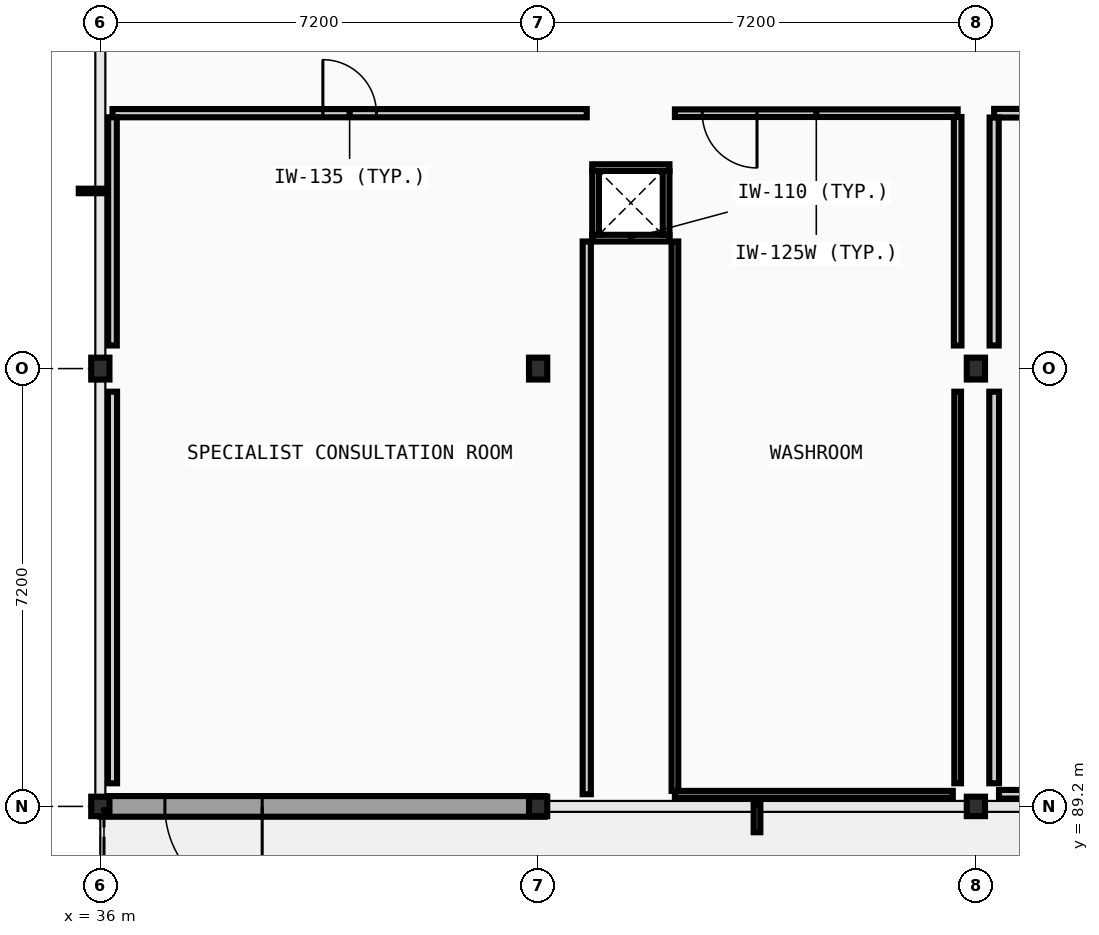
"""IFC4 building model, lengths in metres.
Left out: names, types, materials, properties, quantities, classifications, styles, units other than length and angle.
Written with IfcOpenShell. Run it as: python <this file> out.ifc"""

import sys

from ifc_helpers import new_model, si_unit, direction, frame, frame_2d, origin, origin_2d, place, context, subcontext, project, spatial, rectangle, i_section, extrude, element, fill, save


model = new_model("IFC4")
c1 = context("Model", 3, precision=1e-05, world=origin(), true_north=direction((0.0, 1.0)))
c2 = subcontext(c1, "Body", "Model", "MODEL_VIEW")
j1 = project(units=[si_unit("LENGTHUNIT", "METRE"), si_unit("PLANEANGLEUNIT", "RADIAN")], contexts=[c1])
p1 = place(None, origin())
s1 = spatial("IfcSite", under=j1, at=p1, CompositionType="ELEMENT")
p2 = place(p1, origin())
s2 = spatial("IfcBuilding", under=s1, at=p2, CompositionType="ELEMENT")
p3 = place(p2, frame((0.0, 0.0, 14.0)))
s3 = spatial("IfcBuildingStorey", under=s2, at=p3, CompositionType="ELEMENT", Elevation=14.0)
p4 = place(p3, frame((36.0, 89.2, 0.0), z_axis=(0.0, 0.0, 1.0), x_axis=(1.0, 0.0, 0.0)))
e1 = element("IfcColumn", 1, at=p4, inside=s3, PredefinedType="COLUMN", context=c2, shape_type="SweptSolid", body=[
    extrude(i_section(OverallWidth=0.3, OverallDepth=0.32, WebThickness=0.011, FlangeThickness=0.021, FilletRadius=0.027, at=origin_2d()), origin(), (0.0, 0.0, 1.0), 4.4),
])
p5 = place(p3, frame((36.0, 96.4, 0.0), z_axis=(0.0, 0.0, 1.0), x_axis=(1.0, 0.0, 0.0)))
e2 = element("IfcColumn", 2, at=p5, inside=s3, PredefinedType="COLUMN", context=c2, shape_type="SweptSolid", body=[
    extrude(i_section(OverallWidth=0.3, OverallDepth=0.36, WebThickness=0.012, FlangeThickness=0.022, FilletRadius=0.027, at=origin_2d()), origin(), (0.0, 0.0, 1.0), 4.4),
])
p6 = place(p3, frame((43.2, 89.2, 0.0), z_axis=(0.0, 0.0, 1.0), x_axis=(1.0, 0.0, 0.0)))
e3 = element("IfcColumn", 3, at=p6, inside=s3, PredefinedType="COLUMN", context=c2, shape_type="SweptSolid", body=[
    extrude(i_section(OverallWidth=0.3, OverallDepth=0.32, WebThickness=0.011, FlangeThickness=0.021, FilletRadius=0.027, at=origin_2d()), origin(), (0.0, 0.0, 1.0), 4.4),
])
p7 = place(p3, frame((43.2, 96.4, 0.0), z_axis=(0.0, 0.0, 1.0), x_axis=(1.0, 0.0, 0.0)))
e4 = element("IfcColumn", 4, at=p7, inside=s3, PredefinedType="COLUMN", context=c2, shape_type="SweptSolid", body=[
    extrude(i_section(OverallWidth=0.3, OverallDepth=0.36, WebThickness=0.012, FlangeThickness=0.022, FilletRadius=0.027, at=origin_2d()), origin(), (0.0, 0.0, 1.0), 4.4),
])
p8 = place(p3, frame((50.4, 89.2, 0.0), z_axis=(0.0, 0.0, 1.0), x_axis=(1.0, 0.0, 0.0)))
e5 = element("IfcColumn", 5, at=p8, inside=s3, PredefinedType="COLUMN", context=c2, shape_type="SweptSolid", body=[
    extrude(i_section(OverallWidth=0.3, OverallDepth=0.32, WebThickness=0.011, FlangeThickness=0.021, FilletRadius=0.027, at=origin_2d()), origin(), (0.0, 0.0, 1.0), 4.4),
])
p9 = place(p3, frame((50.4, 96.4, 0.0), z_axis=(0.0, 0.0, 1.0), x_axis=(1.0, 0.0, 0.0)))
e6 = element("IfcColumn", 6, at=p9, inside=s3, PredefinedType="COLUMN", context=c2, shape_type="SweptSolid", body=[
    extrude(i_section(OverallWidth=0.3, OverallDepth=0.36, WebThickness=0.012, FlangeThickness=0.022, FilletRadius=0.027, at=origin_2d()), origin(), (0.0, 0.0, 1.0), 4.4),
])
p10 = place(p3, frame((36.0, 89.2, 0.0), z_axis=(0.0, 0.0, 1.0), x_axis=(1.0, 0.0, 0.0)))
e7 = element("IfcWall", 7, at=p10, inside=s3, PredefinedType="STANDARD", context=c2, shape_type="SweptSolid", body=[
    extrude(rectangle(XDim=7.31, YDim=0.34, at=frame_2d((3.655, 0.0))), origin(), (0.0, 0.0, 1.0), 3.935),
])
p11 = place(p10, frame((1.062, 0.0, 0.0)))
e8 = element("IfcOpeningElement", 8, at=p11, cuts=e7, PredefinedType="OPENING", context=c2, shape_type="SweptSolid", body=[
    extrude(rectangle(XDim=1.6, YDim=2.2, at=frame_2d((0.8, 1.1))), frame((0.0, 0.18, 0.0), z_axis=(0.0, -1.0, 0.0), x_axis=(1.0, 0.0, 0.0)), (0.0, 0.0, 1.0), 0.36),
])
for number, where, z_axis, x_axis in (
    (9, (44.09, 98.545, 0.0), (0.0, 0.0, 1.0), (1.0, 0.0, 0.0)),
    (10, (44.09, 99.705, 0.0), (0.0, 0.0, 1.0), (1.0, 0.0, 0.0)),
):
    element("IfcWall", number, at=place(p3, frame(where, z_axis=z_axis, x_axis=x_axis)), inside=s3, PredefinedType="PARTITIONING", context=c2, shape_type="SweptSolid", body=[
        extrude(rectangle(XDim=1.27, YDim=0.11, at=frame_2d((0.635, 0.0))), origin(), (0.0, 0.0, 1.0), 4.2),
    ])
for number, where, z_axis, x_axis in (
    (11, (44.145, 98.6, 0.0), (0.0, 0.0, 1.0), (0.0, 1.0, 0.0)),
    (12, (45.305, 98.6, 0.0), (0.0, 0.0, 1.0), (0.0, 1.0, 0.0)),
):
    element("IfcWall", number, at=place(p3, frame(where, z_axis=z_axis, x_axis=x_axis)), inside=s3, PredefinedType="PARTITIONING", context=c2, shape_type="SweptSolid", body=[
        extrude(rectangle(XDim=1.05, YDim=0.11, at=frame_2d((0.525, 0.0))), origin(), (0.0, 0.0, 1.0), 4.2),
    ])
p12 = place(p3, frame((45.45, 89.4, 0.0), z_axis=(0.0, 0.0, 1.0), x_axis=(1.0, 0.0, 0.0)))
e13 = element("IfcWall", 13, at=p12, inside=s3, PredefinedType="PARTITIONING", context=c2, shape_type="SweptSolid", body=[
    extrude(rectangle(XDim=4.57, YDim=0.11, at=frame_2d((2.285, 0.0))), origin(), (0.0, 0.0, 1.0), 3.935),
])
p13 = place(p3, frame((50.78, 89.4, 0.0), z_axis=(0.0, 0.0, 1.0), x_axis=(1.0, 0.0, 0.0)))
e14 = element("IfcWall", 14, at=p13, inside=s3, PredefinedType="PARTITIONING", context=c2, shape_type="SweptSolid", body=[
    extrude(rectangle(XDim=6.44, YDim=0.142, at=frame_2d((3.22, 0.0))), origin(), (0.0, 0.0, 1.0), 3.935),
])
p14 = place(p3, frame((36.2, 100.6, 0.0), z_axis=(0.0, 0.0, 1.0), x_axis=(1.0, 0.0, 0.0)))
e15 = element("IfcWall", 15, at=p14, inside=s3, PredefinedType="PARTITIONING", context=c2, shape_type="SweptSolid", body=[
    extrude(rectangle(XDim=7.8, YDim=0.135, at=frame_2d((3.9, 0.0))), origin(), (0.0, 0.0, 1.0), 4.2),
])
p15 = place(p14, frame((3.46, 0.0, 0.0)))
e16 = element("IfcOpeningElement", 16, at=p15, cuts=e15, PredefinedType="OPENING", context=c2, shape_type="SweptSolid", body=[
    extrude(rectangle(XDim=0.88, YDim=2.068, at=frame_2d((0.44, 1.034))), frame((0.0, 0.078, 0.0), z_axis=(0.0, -1.0, 0.0), x_axis=(1.0, 0.0, 0.0)), (0.0, 0.0, 1.0), 0.155),
])
p16 = place(p3, frame((45.45, 100.6, 0.0), z_axis=(0.0, 0.0, 1.0), x_axis=(1.0, 0.0, 0.0)))
e17 = element("IfcWall", 17, at=p16, inside=s3, PredefinedType="PARTITIONING", context=c2, shape_type="SweptSolid", body=[
    extrude(rectangle(XDim=4.65, YDim=0.125, at=frame_2d((2.325, 0.0))), origin(), (0.0, 0.0, 1.0), 4.2),
])
p17 = place(p16, frame((0.45, 0.0, 0.0)))
e18 = element("IfcOpeningElement", 18, at=p17, cuts=e17, PredefinedType="OPENING", context=c2, shape_type="SweptSolid", body=[
    extrude(rectangle(XDim=0.9, YDim=2.1, at=frame_2d((0.45, 1.05))), frame((0.0, 0.073, 0.0), z_axis=(0.0, -1.0, 0.0), x_axis=(1.0, 0.0, 0.0)), (0.0, 0.0, 1.0), 0.145),
])
p18 = place(p3, frame((50.7, 100.6, 0.0), z_axis=(0.0, 0.0, 1.0), x_axis=(1.0, 0.0, 0.0)))
e19 = element("IfcWall", 19, at=p18, inside=s3, PredefinedType="PARTITIONING", context=c2, shape_type="SweptSolid", body=[
    extrude(rectangle(XDim=13.9, YDim=0.142, at=frame_2d((6.95, 0.0))), origin(), (0.0, 0.0, 1.0), 4.2),
])
p19 = place(p18, frame((2.629, 0.0, 0.0)))
e20 = element("IfcOpeningElement", 20, at=p19, cuts=e19, PredefinedType="OPENING", context=c2, shape_type="SweptSolid", body=[
    extrude(rectangle(XDim=1.192, YDim=2.04, at=frame_2d((0.596, 1.02))), frame((0.0, 0.081, 0.0), z_axis=(0.0, -1.0, 0.0), x_axis=(1.0, 0.0, 0.0)), (0.0, 0.0, 1.0), 0.162),
])
p20 = place(p18, frame((9.6, 0.0, 0.0)))
e21 = element("IfcOpeningElement", 21, at=p20, cuts=e19, PredefinedType="OPENING", context=c2, shape_type="SweptSolid", body=[
    extrude(rectangle(XDim=1.15, YDim=2.15, at=frame_2d((0.575, 1.075))), frame((0.0, 0.081, 0.0), z_axis=(0.0, -1.0, 0.0), x_axis=(1.0, 0.0, 0.0)), (0.0, 0.0, 1.0), 0.162),
])
p21 = place(p3, frame((36.2, 89.58, 0.0), z_axis=(0.0, 0.0, 1.0), x_axis=(0.0, 1.0, 0.0)))
e22 = element("IfcWall", 22, at=p21, inside=s3, PredefinedType="PARTITIONING", context=c2, shape_type="SweptSolid", body=[
    extrude(rectangle(XDim=6.44, YDim=0.15, at=frame_2d((3.22, 0.0))), origin(), (0.0, 0.0, 1.0), 3.885),
])
p22 = place(p3, frame((36.2, 96.78, 0.0), z_axis=(0.0, 0.0, 1.0), x_axis=(0.0, 1.0, 0.0)))
e23 = element("IfcWall", 23, at=p22, inside=s3, PredefinedType="PARTITIONING", context=c2, shape_type="SweptSolid", body=[
    extrude(rectangle(XDim=3.752, YDim=0.142, at=frame_2d((1.876, 0.0))), origin(), (0.0, 0.0, 1.0), 3.885),
])
p23 = place(p3, frame((44.0, 89.4, 0.0), z_axis=(0.0, 0.0, 1.0), x_axis=(0.0, 1.0, 0.0)))
e24 = element("IfcWall", 24, at=p23, inside=s3, PredefinedType="PARTITIONING", context=c2, shape_type="SweptSolid", body=[
    extrude(rectangle(XDim=9.09, YDim=0.135, at=frame_2d((4.545, 0.0))), origin(), (0.0, 0.0, 1.0), 4.2),
])
p24 = place(p3, frame((45.45, 89.455, 0.0), z_axis=(0.0, 0.0, 1.0), x_axis=(0.0, 1.0, 0.0)))
e25 = element("IfcWall", 25, at=p24, inside=s3, PredefinedType="PARTITIONING", context=c2, shape_type="SweptSolid", body=[
    extrude(rectangle(XDim=9.035, YDim=0.11, at=frame_2d((4.518, 0.0))), origin(), (0.0, 0.0, 1.0), 3.945),
])
p25 = place(p3, frame((50.1, 89.58, 0.0), z_axis=(0.0, 0.0, 1.0), x_axis=(0.0, 1.0, 0.0)))
e26 = element("IfcWall", 26, at=p25, inside=s3, PredefinedType="PARTITIONING", context=c2, shape_type="SweptSolid", body=[
    extrude(rectangle(XDim=6.44, YDim=0.11, at=frame_2d((3.22, 0.0))), origin(), (0.0, 0.0, 1.0), 4.2),
])
p26 = place(p3, frame((50.1, 96.78, 0.0), z_axis=(0.0, 0.0, 1.0), x_axis=(0.0, 1.0, 0.0)))
e27 = element("IfcWall", 27, at=p26, inside=s3, PredefinedType="PARTITIONING", context=c2, shape_type="SweptSolid", body=[
    extrude(rectangle(XDim=3.758, YDim=0.125, at=frame_2d((1.879, 0.0))), origin(), (0.0, 0.0, 1.0), 4.2),
])
p27 = place(p3, frame((50.7, 89.58, 0.0), z_axis=(0.0, 0.0, 1.0), x_axis=(0.0, 1.0, 0.0)))
e28 = element("IfcWall", 28, at=p27, inside=s3, PredefinedType="PARTITIONING", context=c2, shape_type="SweptSolid", body=[
    extrude(rectangle(XDim=6.44, YDim=0.16, at=frame_2d((3.22, 0.0))), origin(), (0.0, 0.0, 1.0), 3.895),
])
p28 = place(p3, frame((50.7, 96.78, 0.0), z_axis=(0.0, 0.0, 1.0), x_axis=(0.0, 1.0, 0.0)))
e29 = element("IfcWall", 29, at=p28, inside=s3, PredefinedType="PARTITIONING", context=c2, shape_type="SweptSolid", body=[
    extrude(rectangle(XDim=3.749, YDim=0.15, at=frame_2d((1.875, 0.0))), origin(), (0.0, 0.0, 1.0), 3.895),
])
p29 = place(p11, origin())
e30 = element("IfcDoor", 30, at=p29, inside=s3, OperationType="DOUBLE_DOOR_SINGLE_SWING", PredefinedType="DOOR", context=c2, shape_type="SweptSolid", body=[
    extrude(rectangle(XDim=1.6, YDim=2.2, at=frame_2d((0.8, 1.1))), frame((0.0, 0.025, 0.0), z_axis=(0.0, -1.0, 0.0), x_axis=(1.0, 0.0, 0.0)), (0.0, 0.0, 1.0), 0.05),
])
fill(e8, e30)
p30 = place(p17, origin())
e31 = element("IfcDoor", 31, at=p30, inside=s3, OperationType="SINGLE_SWING_RIGHT", PredefinedType="DOOR", context=c2, shape_type="SweptSolid", body=[
    extrude(rectangle(XDim=0.9, YDim=2.1, at=frame_2d((0.45, 1.05))), frame((0.0, 0.025, 0.0), z_axis=(0.0, -1.0, 0.0), x_axis=(1.0, 0.0, 0.0)), (0.0, 0.0, 1.0), 0.05),
])
fill(e18, e31)
p31 = place(p15, origin())
e32 = element("IfcDoor", 32, at=p31, inside=s3, OperationType="SINGLE_SWING_LEFT", PredefinedType="DOOR", context=c2, shape_type="SweptSolid", body=[
    extrude(rectangle(XDim=0.88, YDim=2.068, at=frame_2d((0.44, 1.034))), frame((0.0, 0.025, 0.0), z_axis=(0.0, -1.0, 0.0), x_axis=(1.0, 0.0, 0.0)), (0.0, 0.0, 1.0), 0.05),
])
fill(e16, e32)
save(model, sys.argv[1])
